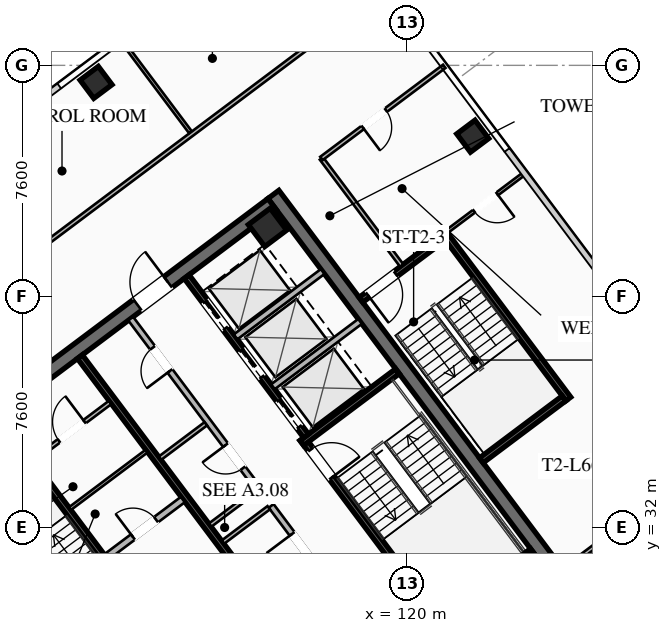
"""IFC4 building model, lengths in metres.
Left out: names, types, materials, properties, quantities, classifications, styles, units other than length and angle.
Written with IfcOpenShell. Run it as: python <this file> out.ifc"""

import sys

from ifc_helpers import new_model, si_unit, direction, frame, frame_2d, origin, origin_2d, place, context, subcontext, project, spatial, rectangle, hollow_rectangle, extrude, element, fill, save


model = new_model("IFC4")
c1 = context("Model", 3, precision=1e-05, world=origin(), true_north=direction((0.0, 1.0)))
c2 = subcontext(c1, "Body", "Model", "MODEL_VIEW")
j1 = project(units=[si_unit("LENGTHUNIT", "METRE"), si_unit("PLANEANGLEUNIT", "RADIAN")], contexts=[c1])
p1 = place(None, origin())
s1 = spatial("IfcSite", under=j1, at=p1, CompositionType="ELEMENT")
p2 = place(p1, origin())
s2 = spatial("IfcBuilding", under=s1, at=p2, CompositionType="ELEMENT")
p3 = place(p2, frame((0.0, 0.0, 243.25)))
s3 = spatial("IfcBuildingStorey", under=s2, at=p3, CompositionType="ELEMENT", Elevation=243.25)
for number, where, z_axis, x_axis in (
    (1, (112.396, 21.047, 0.0), (0.0, 0.0, 1.0), (-0.6, 0.8, 0.0)),
    (2, (115.604, 42.953, 0.0), (0.0, 0.0, 1.0), (0.6, -0.8, 0.0)),
):
    element("IfcWall", number, at=place(p3, frame(where, z_axis=z_axis, x_axis=x_axis)), inside=s3, PredefinedType="SHEAR", context=c2, shape_type="SweptSolid", body=[
        extrude(rectangle(XDim=15.6, YDim=0.45, at=frame_2d((7.8, 0.0))), origin(), (0.0, 0.0, 1.0), 3.55),
    ])
p4 = place(p3, frame((103.351, 33.482, 0.0), z_axis=(0.0, 0.0, 1.0), x_axis=(0.8, 0.6, 0.0)))
e3 = element("IfcWall", 3, at=p4, inside=s3, PredefinedType="SHEAR", context=c2, shape_type="SweptSolid", body=[
    extrude(rectangle(XDim=15.26, YDim=0.45, at=frame_2d((7.63, 0.0))), origin(), (0.0, 0.0, 1.0), 3.55),
])
p5 = place(p4, frame((4.68, 0.0, 0.0)))
e4 = element("IfcOpeningElement", 4, at=p5, cuts=e3, PredefinedType="OPENING", context=c2, shape_type="SweptSolid", body=[
    extrude(rectangle(XDim=1.25, YDim=2.25, at=frame_2d((0.625, 1.125))), frame((0.0, 0.235, 0.0), z_axis=(0.0, -1.0, 0.0), x_axis=(1.0, 0.0, 0.0)), (0.0, 0.0, 1.0), 0.47),
])
p6 = place(p4, frame((9.73, 0.0, 0.0)))
e5 = element("IfcOpeningElement", 5, at=p6, cuts=e3, PredefinedType="OPENING", context=c2, shape_type="SweptSolid", body=[
    extrude(rectangle(XDim=1.25, YDim=2.25, at=frame_2d((0.625, 1.125))), frame((0.0, 0.235, 0.0), z_axis=(0.0, -1.0, 0.0), x_axis=(1.0, 0.0, 0.0)), (0.0, 0.0, 1.0), 0.47),
])
for number, where, z_axis, x_axis in (
    (6, (123.87, 30.59, 0.0), (0.0, 0.0, 1.0), (0.8, 0.6, 0.0)),
    (7, (115.41, 41.87, 0.0), (0.0, 0.0, 1.0), (0.8, 0.6, 0.0)),
):
    element("IfcColumn", number, at=place(p3, frame(where, z_axis=z_axis, x_axis=x_axis)), inside=s3, PredefinedType="COLUMN", context=c2, shape_type="SweptSolid", body=[
        extrude(hollow_rectangle(XDim=0.9, YDim=0.9, WallThickness=0.04, at=origin_2d()), origin(), (0.0, 0.0, 1.0), 3.25),
    ])
for number, where, z_axis, x_axis in (
    (8, (122.16, 44.87, 0.0), (0.0, 0.0, 1.0), (0.8, 0.6, 0.0)),
    (9, (109.77, 46.64, 0.0), (0.0, 0.0, 1.0), (0.8, 0.6, 0.0)),
):
    element("IfcColumn", number, at=place(p3, frame(where, z_axis=z_axis, x_axis=x_axis)), inside=s3, PredefinedType="COLUMN", context=c2, shape_type="SweptSolid", body=[
        extrude(hollow_rectangle(XDim=0.75, YDim=0.75, WallThickness=0.032, at=origin_2d()), origin(), (0.0, 0.0, 1.0), 3.25),
    ])
p7 = place(p3, frame((111.44, 29.08, 0.0), z_axis=(0.0, 0.0, 1.0), x_axis=(-0.59999041401, 0.800007189403, 0.0)))
e10 = element("IfcWall", 10, at=p7, inside=s3, PredefinedType="SHEAR", context=c2, shape_type="SweptSolid", body=[
    extrude(rectangle(XDim=8.15, YDim=0.2, at=frame_2d((4.075, 0.0))), origin(), (0.0, 0.0, 1.0), 3.25),
])
p8 = place(p7, frame((0.45, 0.0, 0.0)))
e11 = element("IfcOpeningElement", 11, at=p8, cuts=e10, PredefinedType="OPENING", context=c2, shape_type="SweptSolid", body=[
    extrude(rectangle(XDim=1.15, YDim=2.2, at=frame_2d((0.575, 1.1))), frame((0.0, 0.11, 0.0), z_axis=(0.0, -1.0, 0.0), x_axis=(1.0, 0.0, 0.0)), (0.0, 0.0, 1.0), 0.22),
])
p9 = place(p3, frame((116.56, 34.92, 0.0), z_axis=(0.0, 0.0, 1.0), x_axis=(0.59999041401, -0.800007189403, 0.0)))
e12 = element("IfcWall", 12, at=p9, inside=s3, PredefinedType="SHEAR", context=c2, shape_type="SweptSolid", body=[
    extrude(rectangle(XDim=8.15, YDim=0.2, at=frame_2d((4.075, 0.0))), origin(), (0.0, 0.0, 1.0), 3.25),
])
p10 = place(p9, frame((0.45, 0.0, 0.0)))
e13 = element("IfcOpeningElement", 13, at=p10, cuts=e12, PredefinedType="OPENING", context=c2, shape_type="SweptSolid", body=[
    extrude(rectangle(XDim=1.15, YDim=2.2, at=frame_2d((0.575, 1.1))), frame((0.0, 0.11, 0.0), z_axis=(0.0, -1.0, 0.0), x_axis=(1.0, 0.0, 0.0)), (0.0, 0.0, 1.0), 0.22),
])
for number, where, z_axis, x_axis in (
    (14, (116.54, 34.78, 0.0), (0.0, 0.0, 1.0), (0.8, 0.6, 0.0)),
    (15, (120.98, 28.86, 0.0), (0.0, 0.0, 1.0), (0.8, 0.6, 0.0)),
):
    element("IfcWall", number, at=place(p3, frame(where, z_axis=z_axis, x_axis=x_axis)), inside=s3, PredefinedType="SHEAR", context=c2, shape_type="SweptSolid", body=[
        extrude(rectangle(XDim=3.93, YDim=0.2, at=frame_2d((1.965, 0.0))), origin(), (0.0, 0.0, 1.0), 3.25),
    ])
p11 = place(p3, frame((118.058, 25.856, 0.0), z_axis=(0.0, 0.0, 1.0), x_axis=(-0.600002657301, 0.799998007018, 0.0)))
e16 = element("IfcWall", 16, at=p11, inside=s3, PredefinedType="SHEAR", context=c2, shape_type="SweptSolid", body=[
    extrude(rectangle(XDim=14.7, YDim=0.2, at=frame_2d((7.35, 0.0))), origin(), (0.0, 0.0, 1.0), 3.25),
])
p12 = place(p3, frame((110.104, 31.028, 0.0), z_axis=(0.0, 0.0, 1.0), x_axis=(0.800018601094, 0.59997519774, 0.0)))
e17 = element("IfcWall", 17, at=p12, inside=s3, PredefinedType="SOLIDWALL", context=c2, shape_type="SweptSolid", body=[
    extrude(rectangle(XDim=3.15, YDim=0.22, at=frame_2d((1.575, 0.0))), origin(), (0.0, 0.0, 1.0), 2.393),
])
p13 = place(p12, frame((1.1, 0.0, 0.0)))
e18 = element("IfcOpeningElement", 18, at=p13, cuts=e17, PredefinedType="OPENING", context=c2, shape_type="SweptSolid", body=[
    extrude(rectangle(XDim=0.95, YDim=2.05, at=frame_2d((0.475, 1.025))), frame((0.0, 0.12, 0.0), z_axis=(0.0, -1.0, 0.0), x_axis=(1.0, 0.0, 0.0)), (0.0, 0.0, 1.0), 0.24),
])
p14 = place(p3, frame((112.75, 40.25, 0.0), z_axis=(0.0, 0.0, 1.0), x_axis=(0.599994036198, -0.800004472816, 0.0)))
e19 = element("IfcWall", 19, at=p14, inside=s3, PredefinedType="SHEAR", context=c2, shape_type="SweptSolid", body=[
    extrude(rectangle(XDim=6.55, YDim=0.2, at=frame_2d((3.275, 0.0))), origin(), (0.0, 0.0, 1.0), 3.25),
])
p15 = place(p14, frame((5.075, 0.0, 0.0)))
e20 = element("IfcOpeningElement", 20, at=p15, cuts=e19, PredefinedType="OPENING", context=c2, shape_type="SweptSolid", body=[
    extrude(rectangle(XDim=1.1, YDim=2.2, at=frame_2d((0.55, 1.1))), frame((0.0, 0.11, 0.0), z_axis=(0.0, -1.0, 0.0), x_axis=(1.0, 0.0, 0.0)), (0.0, 0.0, 1.0), 0.22),
])
p16 = place(p14, frame((3.025, 0.0, 0.0)))
e21 = element("IfcOpeningElement", 21, at=p16, cuts=e19, PredefinedType="OPENING", context=c2, shape_type="SweptSolid", body=[
    extrude(rectangle(XDim=1.1, YDim=2.2, at=frame_2d((0.55, 1.1))), frame((0.0, 0.11, 0.0), z_axis=(0.0, -1.0, 0.0), x_axis=(1.0, 0.0, 0.0)), (0.0, 0.0, 1.0), 0.22),
])
p17 = place(p14, frame((1.025, 0.0, 0.0)))
e22 = element("IfcOpeningElement", 22, at=p17, cuts=e19, PredefinedType="OPENING", context=c2, shape_type="SweptSolid", body=[
    extrude(rectangle(XDim=1.1, YDim=2.2, at=frame_2d((0.55, 1.1))), frame((0.0, 0.11, 0.0), z_axis=(0.0, -1.0, 0.0), x_axis=(1.0, 0.0, 0.0)), (0.0, 0.0, 1.0), 0.22),
])
for number, where, z_axis, x_axis in (
    (23, (115.59, 36.63, 0.0), (0.0, 0.0, 1.0), (0.8, 0.6, 0.0)),
    (24, (114.36, 38.27, 0.0), (0.0, 0.0, 1.0), (0.8, 0.6, 0.0)),
):
    element("IfcWall", number, at=place(p3, frame(where, z_axis=z_axis, x_axis=x_axis)), inside=s3, PredefinedType="SOLIDWALL", context=c2, shape_type="SweptSolid", body=[
        extrude(rectangle(XDim=3.58, YDim=0.2, at=frame_2d((1.79, 0.0))), origin(), (0.0, 0.0, 1.0), 3.25),
    ])
p18 = place(p3, frame((107.71, 34.22, 0.0), z_axis=(0.0, 0.0, 1.0), x_axis=(0.799981399002, 0.60002480053, 0.0)))
e25 = element("IfcWall", 25, at=p18, inside=s3, PredefinedType="PARTITIONING", context=c2, shape_type="SweptSolid", body=[
    extrude(rectangle(XDim=3.15, YDim=0.135, at=frame_2d((1.575, 0.0))), origin(), (0.0, 0.0, 1.0), 2.393),
])
p19 = place(p18, frame((1.05, 0.0, 0.0)))
e26 = element("IfcOpeningElement", 26, at=p19, cuts=e25, PredefinedType="OPENING", context=c2, shape_type="SweptSolid", body=[
    extrude(rectangle(XDim=1.05, YDim=2.2, at=frame_2d((0.525, 1.1))), frame((0.0, 0.077, 0.0), z_axis=(0.0, -1.0, 0.0), x_axis=(1.0, 0.0, 0.0)), (0.0, 0.0, 1.0), 0.155),
])
p20 = place(p3, frame((108.91, 32.62, 0.0), z_axis=(0.0, 0.0, 1.0), x_axis=(0.800018601094, 0.59997519774, 0.0)))
e27 = element("IfcWall", 27, at=p20, inside=s3, PredefinedType="PARTITIONING", context=c2, shape_type="SweptSolid", body=[
    extrude(rectangle(XDim=3.15, YDim=0.11, at=frame_2d((1.575, 0.0))), origin(), (0.0, 0.0, 1.0), 2.393),
])
p21 = place(p3, frame((119.73, 27.11, 0.0), z_axis=(0.0, 0.0, 1.0), x_axis=(-0.600005580459, 0.799995814625, 0.0)))
e28 = element("IfcWall", 28, at=p21, inside=s3, PredefinedType="SOLIDWALL", context=c2, shape_type="SweptSolid", body=[
    extrude(rectangle(XDim=7.0, YDim=0.2, at=frame_2d((3.5, 0.0))), origin(), (0.0, 0.0, 1.0), 2.393),
])
p22 = place(p21, frame((0.85, 0.0, 0.0)))
e29 = element("IfcOpeningElement", 29, at=p22, cuts=e28, PredefinedType="OPENING", context=c2, shape_type="SweptSolid", body=[
    extrude(rectangle(XDim=0.95, YDim=2.05, at=frame_2d((0.475, 1.025))), frame((0.0, 0.11, 0.0), z_axis=(0.0, -1.0, 0.0), x_axis=(1.0, 0.0, 0.0)), (0.0, 0.0, 1.0), 0.22),
])
p23 = place(p21, frame((4.8, 0.0, 0.0)))
e30 = element("IfcOpeningElement", 30, at=p23, cuts=e28, PredefinedType="OPENING", context=c2, shape_type="SweptSolid", body=[
    extrude(rectangle(XDim=1.05, YDim=2.2, at=frame_2d((0.525, 1.1))), frame((0.0, 0.11, 0.0), z_axis=(0.0, -1.0, 0.0), x_axis=(1.0, 0.0, 0.0)), (0.0, 0.0, 1.0), 0.22),
])
p24 = place(p3, frame((113.946, 31.522, 0.0), z_axis=(0.0, 0.0, 1.0), x_axis=(0.8, 0.6, 0.0)))
e31 = element("IfcWall", 31, at=p24, inside=s3, PredefinedType="PARTITIONING", context=c2, shape_type="SweptSolid", body=[
    extrude(rectangle(XDim=1.88, YDim=0.135, at=frame_2d((0.94, 0.0))), origin(), (0.0, 0.0, 1.0), 2.393),
])
p25 = place(p3, frame((115.11, 33.27, 0.0), z_axis=(0.0, 0.0, 1.0), x_axis=(-0.600011160345, 0.79999162962, 0.0)))
e32 = element("IfcWall", 32, at=p25, inside=s3, PredefinedType="SOLIDWALL", context=c2, shape_type="SweptSolid", body=[
    extrude(rectangle(XDim=7.0, YDim=0.2, at=frame_2d((3.5, 0.0))), origin(), (0.0, 0.0, 1.0), 2.393),
])
p26 = place(p25, frame((0.85, 0.0, 0.0)))
e33 = element("IfcOpeningElement", 33, at=p26, cuts=e32, PredefinedType="OPENING", context=c2, shape_type="SweptSolid", body=[
    extrude(rectangle(XDim=0.95, YDim=2.05, at=frame_2d((0.475, 1.025))), frame((0.0, 0.11, 0.0), z_axis=(0.0, -1.0, 0.0), x_axis=(1.0, 0.0, 0.0)), (0.0, 0.0, 1.0), 0.22),
])
p27 = place(p25, frame((4.85, 0.0, 0.0)))
e34 = element("IfcOpeningElement", 34, at=p27, cuts=e32, PredefinedType="OPENING", context=c2, shape_type="SweptSolid", body=[
    extrude(rectangle(XDim=0.95, YDim=2.05, at=frame_2d((0.475, 1.025))), frame((0.0, 0.11, 0.0), z_axis=(0.0, -1.0, 0.0), x_axis=(1.0, 0.0, 0.0)), (0.0, 0.0, 1.0), 0.22),
])
p28 = place(p3, frame((113.526, 32.082, 0.0), z_axis=(0.0, 0.0, 1.0), x_axis=(0.800046745961, 0.599937666993, 0.0)))
e35 = element("IfcWall", 35, at=p28, inside=s3, PredefinedType="PARTITIONING", context=c2, shape_type="SweptSolid", body=[
    extrude(rectangle(XDim=1.88, YDim=0.135, at=frame_2d((0.94, 0.0))), origin(), (0.0, 0.0, 1.0), 2.393),
])
p29 = place(p3, frame((111.876, 34.282, 0.0), z_axis=(0.0, 0.0, 1.0), x_axis=(0.8, 0.6, 0.0)))
e36 = element("IfcWall", 36, at=p29, inside=s3, PredefinedType="PARTITIONING", context=c2, shape_type="SweptSolid", body=[
    extrude(rectangle(XDim=1.88, YDim=0.135, at=frame_2d((0.94, 0.0))), origin(), (0.0, 0.0, 1.0), 2.393),
])
p30 = place(p3, frame((125.304, 36.228, 0.0), z_axis=(0.0, 0.0, 1.0), x_axis=(-0.59998851072, 0.800008616831, 0.0)))
e37 = element("IfcWall", 37, at=p30, inside=s3, PredefinedType="SHEAR", context=c2, shape_type="SweptSolid", body=[
    extrude(rectangle(XDim=6.8, YDim=0.2, at=frame_2d((3.4, 0.0))), origin(), (0.0, 0.0, 1.0), 3.25),
])
p31 = place(p3, frame((121.204, 41.528, 0.0), z_axis=(0.0, 0.0, 1.0), x_axis=(-0.800017232136, -0.599977023131, 0.0)))
e38 = element("IfcWall", 38, at=p31, inside=s3, PredefinedType="SHEAR", context=c2, shape_type="SweptSolid", body=[
    extrude(rectangle(XDim=3.4, YDim=0.2, at=frame_2d((1.7, 0.0))), origin(), (0.0, 0.0, 1.0), 3.25),
])
p32 = place(p31, frame((1.975, 0.0, 0.0)))
e39 = element("IfcOpeningElement", 39, at=p32, cuts=e38, PredefinedType="OPENING", context=c2, shape_type="SweptSolid", body=[
    extrude(rectangle(XDim=1.15, YDim=2.2, at=frame_2d((0.575, 1.1))), frame((0.0, 0.11, 0.0), z_axis=(0.0, -1.0, 0.0), x_axis=(1.0, 0.0, 0.0)), (0.0, 0.0, 1.0), 0.22),
])
p33 = place(p3, frame((122.444, 34.208, 0.0), z_axis=(0.0, 0.0, 1.0), x_axis=(0.79999138319, 0.600011488909, 0.0)))
e40 = element("IfcWall", 40, at=p33, inside=s3, PredefinedType="SHEAR", context=c2, shape_type="SweptSolid", body=[
    extrude(rectangle(XDim=3.4, YDim=0.2, at=frame_2d((1.7, 0.0))), origin(), (0.0, 0.0, 1.0), 3.25),
])
p34 = place(p3, frame((119.824, 40.618, 0.0), z_axis=(0.0, 0.0, 1.0), x_axis=(-0.599982243973, 0.800013316712, 0.0)))
e41 = element("IfcWall", 41, at=p34, inside=s3, PredefinedType="PARTITIONING", context=c2, shape_type="SweptSolid", body=[
    extrude(rectangle(XDim=4.4, YDim=0.135, at=frame_2d((2.2, 0.0))), origin(), (0.0, 0.0, 1.0), 2.393),
])
p35 = place(p3, frame((99.736, 35.052, 0.0), z_axis=(0.0, 0.0, 1.0), x_axis=(0.799997387685, 0.600003483071, 0.0)))
e42 = element("IfcWall", 42, at=p35, inside=s3, PredefinedType="PARTITIONING", context=c2, shape_type="SweptSolid", body=[
    extrude(rectangle(XDim=22.43, YDim=0.135, at=frame_2d((11.215, 0.0))), origin(), (0.0, 0.0, 1.0), 2.393),
])
p36 = place(p35, frame((0.3, 0.0, 0.0)))
e43 = element("IfcOpeningElement", 43, at=p36, cuts=e42, PredefinedType="OPENING", context=c2, shape_type="SweptSolid", body=[
    extrude(rectangle(XDim=0.95, YDim=2.05, at=frame_2d((0.475, 1.025))), frame((0.0, 0.077, 0.0), z_axis=(0.0, -1.0, 0.0), x_axis=(1.0, 0.0, 0.0)), (0.0, 0.0, 1.0), 0.155),
])
p37 = place(p35, frame((9.313, 0.0, 0.0)))
e44 = element("IfcOpeningElement", 44, at=p37, cuts=e42, PredefinedType="OPENING", context=c2, shape_type="SweptSolid", body=[
    extrude(rectangle(XDim=0.95, YDim=2.05, at=frame_2d((0.475, 1.025))), frame((0.0, 0.077, 0.0), z_axis=(0.0, -1.0, 0.0), x_axis=(1.0, 0.0, 0.0)), (0.0, 0.0, 1.0), 0.155),
])
p38 = place(p35, frame((21.18, 0.0, 0.0)))
e45 = element("IfcOpeningElement", 45, at=p38, cuts=e42, PredefinedType="OPENING", context=c2, shape_type="SweptSolid", body=[
    extrude(rectangle(XDim=0.95, YDim=2.05, at=frame_2d((0.475, 1.025))), frame((0.0, 0.077, 0.0), z_axis=(0.0, -1.0, 0.0), x_axis=(1.0, 0.0, 0.0)), (0.0, 0.0, 1.0), 0.155),
])
p39 = place(p3, frame((112.872, 45.004, 0.0), z_axis=(0.0, 0.0, 1.0), x_axis=(-0.6, 0.8, 0.0)))
e46 = element("IfcWall", 46, at=p39, inside=s3, PredefinedType="PARTITIONING", context=c2, shape_type="SweptSolid", body=[
    extrude(rectangle(XDim=3.8, YDim=0.11, at=frame_2d((1.9, 0.0))), origin(), (0.0, 0.0, 1.0), 2.393),
])
p40 = place(p3, frame((121.224, 47.168, 0.0), z_axis=(0.0, 0.0, 1.0), x_axis=(-0.8, -0.6, 0.0)))
e47 = element("IfcWall", 47, at=p40, inside=s3, PredefinedType="PARTITIONING", context=c2, shape_type="SweptSolid", body=[
    extrude(rectangle(XDim=5.05, YDim=0.135, at=frame_2d((2.525, 0.0))), origin(), (0.0, 0.0, 1.0), 2.393),
])
p41 = place(p40, frame((2.4, 0.0, 0.0)))
e48 = element("IfcOpeningElement", 48, at=p41, cuts=e47, PredefinedType="OPENING", context=c2, shape_type="SweptSolid", body=[
    extrude(rectangle(XDim=0.95, YDim=2.05, at=frame_2d((0.475, 1.025))), frame((0.0, 0.077, 0.0), z_axis=(0.0, -1.0, 0.0), x_axis=(1.0, 0.0, 0.0)), (0.0, 0.0, 1.0), 0.155),
])
p42 = place(p3, frame((125.208, 30.656, 0.0), z_axis=(0.0, 0.0, 1.0), x_axis=(0.8, 0.6, 0.0)))
e49 = element("IfcWall", 49, at=p42, inside=s3, PredefinedType="PARTITIONING", context=c2, shape_type="SweptSolid", body=[
    extrude(rectangle(XDim=6.72, YDim=0.135, at=frame_2d((3.36, 0.0))), origin(), (0.0, 0.0, 1.0), 2.393),
])
p43 = place(p3, frame((123.864, 43.648, 0.0), z_axis=(0.0, 0.0, 1.0), x_axis=(-0.800018310174, -0.599975585658, 0.0)))
e50 = element("IfcWall", 50, at=p43, inside=s3, PredefinedType="PARTITIONING", context=c2, shape_type="SweptSolid", body=[
    extrude(rectangle(XDim=3.2, YDim=0.11, at=frame_2d((1.6, 0.0))), origin(), (0.0, 0.0, 1.0), 2.393),
])
p44 = place(p43, frame((1.125, 0.0, 0.0)))
e51 = element("IfcOpeningElement", 51, at=p44, cuts=e50, PredefinedType="OPENING", context=c2, shape_type="SweptSolid", body=[
    extrude(rectangle(XDim=0.95, YDim=2.05, at=frame_2d((0.475, 1.025))), frame((0.0, 0.065, 0.0), z_axis=(0.0, -1.0, 0.0), x_axis=(1.0, 0.0, 0.0)), (0.0, 0.0, 1.0), 0.13),
])
p45 = place(p3, frame((112.15, 18.5, 0.0), z_axis=(0.0, 0.0, 1.0), x_axis=(-0.599998104681, 0.800001421485, 0.0)))
e52 = element("IfcWall", 52, at=p45, inside=s3, PredefinedType="PARTITIONING", context=c2, shape_type="SweptSolid", body=[
    extrude(rectangle(XDim=20.61, YDim=0.135, at=frame_2d((10.305, 0.0))), origin(), (0.0, 0.0, 1.0), 2.393),
])
p46 = place(p45, frame((19.36, 0.0, 0.0)))
e53 = element("IfcOpeningElement", 53, at=p46, cuts=e52, PredefinedType="OPENING", context=c2, shape_type="SweptSolid", body=[
    extrude(rectangle(XDim=0.95, YDim=2.05, at=frame_2d((0.475, 1.025))), frame((0.0, 0.077, 0.0), z_axis=(0.0, -1.0, 0.0), x_axis=(1.0, 0.0, 0.0)), (0.0, 0.0, 1.0), 0.155),
])
p47 = place(p6, origin())
e54 = element("IfcDoor", 54, at=p47, inside=s3, OperationType="SINGLE_SWING_RIGHT", PredefinedType="DOOR", context=c2, shape_type="SweptSolid", body=[
    extrude(rectangle(XDim=1.25, YDim=2.25, at=frame_2d((0.625, 1.125))), frame((0.0, 0.025, 0.0), z_axis=(0.0, -1.0, 0.0), x_axis=(1.0, 0.0, 0.0)), (0.0, 0.0, 1.0), 0.05),
])
fill(e5, e54)
p48 = place(p10, origin())
e55 = element("IfcDoor", 55, at=p48, inside=s3, OperationType="SINGLE_SWING_RIGHT", PredefinedType="DOOR", context=c2, shape_type="SweptSolid", body=[
    extrude(rectangle(XDim=1.15, YDim=2.2, at=frame_2d((0.575, 1.1))), frame((0.0, 0.025, 0.0), z_axis=(0.0, -1.0, 0.0), x_axis=(1.0, 0.0, 0.0)), (0.0, 0.0, 1.0), 0.05),
])
fill(e13, e55)
p49 = place(p19, origin())
e56 = element("IfcDoor", 56, at=p49, inside=s3, OperationType="SINGLE_SWING_RIGHT", PredefinedType="DOOR", context=c2, shape_type="SweptSolid", body=[
    extrude(rectangle(XDim=1.05, YDim=2.2, at=frame_2d((0.525, 1.1))), frame((0.0, 0.025, 0.0), z_axis=(0.0, -1.0, 0.0), x_axis=(1.0, 0.0, 0.0)), (0.0, 0.0, 1.0), 0.05),
])
fill(e26, e56)
p50 = place(p13, origin())
e57 = element("IfcDoor", 57, at=p50, inside=s3, OperationType="SINGLE_SWING_LEFT", PredefinedType="DOOR", context=c2, shape_type="SweptSolid", body=[
    extrude(rectangle(XDim=0.95, YDim=2.05, at=frame_2d((0.475, 1.025))), frame((0.0, 0.025, 0.0), z_axis=(0.0, -1.0, 0.0), x_axis=(1.0, 0.0, 0.0)), (0.0, 0.0, 1.0), 0.05),
])
fill(e18, e57)
p51 = place(p23, origin())
e58 = element("IfcDoor", 58, at=p51, inside=s3, OperationType="SINGLE_SWING_RIGHT", PredefinedType="DOOR", context=c2, shape_type="SweptSolid", body=[
    extrude(rectangle(XDim=1.05, YDim=2.2, at=frame_2d((0.525, 1.1))), frame((0.0, 0.025, 0.0), z_axis=(0.0, -1.0, 0.0), x_axis=(1.0, 0.0, 0.0)), (0.0, 0.0, 1.0), 0.05),
])
fill(e30, e58)
p52 = place(p26, origin())
e59 = element("IfcDoor", 59, at=p52, inside=s3, OperationType="SINGLE_SWING_RIGHT", PredefinedType="DOOR", context=c2, shape_type="SweptSolid", body=[
    extrude(rectangle(XDim=0.95, YDim=2.05, at=frame_2d((0.475, 1.025))), frame((0.0, 0.025, 0.0), z_axis=(0.0, -1.0, 0.0), x_axis=(1.0, 0.0, 0.0)), (0.0, 0.0, 1.0), 0.05),
])
fill(e33, e59)
p53 = place(p27, origin())
e60 = element("IfcDoor", 60, at=p53, inside=s3, OperationType="SINGLE_SWING_LEFT", PredefinedType="DOOR", context=c2, shape_type="SweptSolid", body=[
    extrude(rectangle(XDim=0.95, YDim=2.05, at=frame_2d((0.475, 1.025))), frame((0.0, 0.025, 0.0), z_axis=(0.0, -1.0, 0.0), x_axis=(1.0, 0.0, 0.0)), (0.0, 0.0, 1.0), 0.05),
])
fill(e34, e60)
p54 = place(p32, origin())
e61 = element("IfcDoor", 61, at=p54, inside=s3, OperationType="SINGLE_SWING_RIGHT", PredefinedType="DOOR", context=c2, shape_type="SweptSolid", body=[
    extrude(rectangle(XDim=1.15, YDim=2.2, at=frame_2d((0.575, 1.1))), frame((0.0, 0.025, 0.0), z_axis=(0.0, -1.0, 0.0), x_axis=(1.0, 0.0, 0.0)), (0.0, 0.0, 1.0), 0.05),
])
fill(e39, e61)
p55 = place(p41, origin())
e62 = element("IfcDoor", 62, at=p55, inside=s3, OperationType="SINGLE_SWING_RIGHT", PredefinedType="DOOR", context=c2, shape_type="SweptSolid", body=[
    extrude(rectangle(XDim=0.95, YDim=2.05, at=frame_2d((0.475, 1.025))), frame((0.0, 0.025, 0.0), z_axis=(0.0, -1.0, 0.0), x_axis=(1.0, 0.0, 0.0)), (0.0, 0.0, 1.0), 0.05),
])
fill(e48, e62)
p56 = place(p44, origin())
e63 = element("IfcDoor", 63, at=p56, inside=s3, OperationType="SINGLE_SWING_LEFT", PredefinedType="DOOR", context=c2, shape_type="SweptSolid", body=[
    extrude(rectangle(XDim=0.95, YDim=2.05, at=frame_2d((0.475, 1.025))), frame((0.0, 0.025, 0.0), z_axis=(0.0, -1.0, 0.0), x_axis=(1.0, 0.0, 0.0)), (0.0, 0.0, 1.0), 0.05),
])
fill(e51, e63)
p57 = place(p15, origin())
e64 = element("IfcDoor", 64, at=p57, inside=s3, OperationType="SLIDING_TO_LEFT", PredefinedType="DOOR", context=c2, shape_type="SweptSolid", body=[
    extrude(rectangle(XDim=1.1, YDim=2.2, at=frame_2d((0.55, 1.1))), frame((0.0, 0.025, 0.0), z_axis=(0.0, -1.0, 0.0), x_axis=(1.0, 0.0, 0.0)), (0.0, 0.0, 1.0), 0.05),
])
fill(e20, e64)
p58 = place(p16, origin())
e65 = element("IfcDoor", 65, at=p58, inside=s3, OperationType="SLIDING_TO_LEFT", PredefinedType="DOOR", context=c2, shape_type="SweptSolid", body=[
    extrude(rectangle(XDim=1.1, YDim=2.2, at=frame_2d((0.55, 1.1))), frame((0.0, 0.025, 0.0), z_axis=(0.0, -1.0, 0.0), x_axis=(1.0, 0.0, 0.0)), (0.0, 0.0, 1.0), 0.05),
])
fill(e21, e65)
p59 = place(p17, origin())
e66 = element("IfcDoor", 66, at=p59, inside=s3, OperationType="SLIDING_TO_LEFT", PredefinedType="DOOR", context=c2, shape_type="SweptSolid", body=[
    extrude(rectangle(XDim=1.1, YDim=2.2, at=frame_2d((0.55, 1.1))), frame((0.0, 0.025, 0.0), z_axis=(0.0, -1.0, 0.0), x_axis=(1.0, 0.0, 0.0)), (0.0, 0.0, 1.0), 0.05),
])
fill(e22, e66)
save(model, sys.argv[1])
